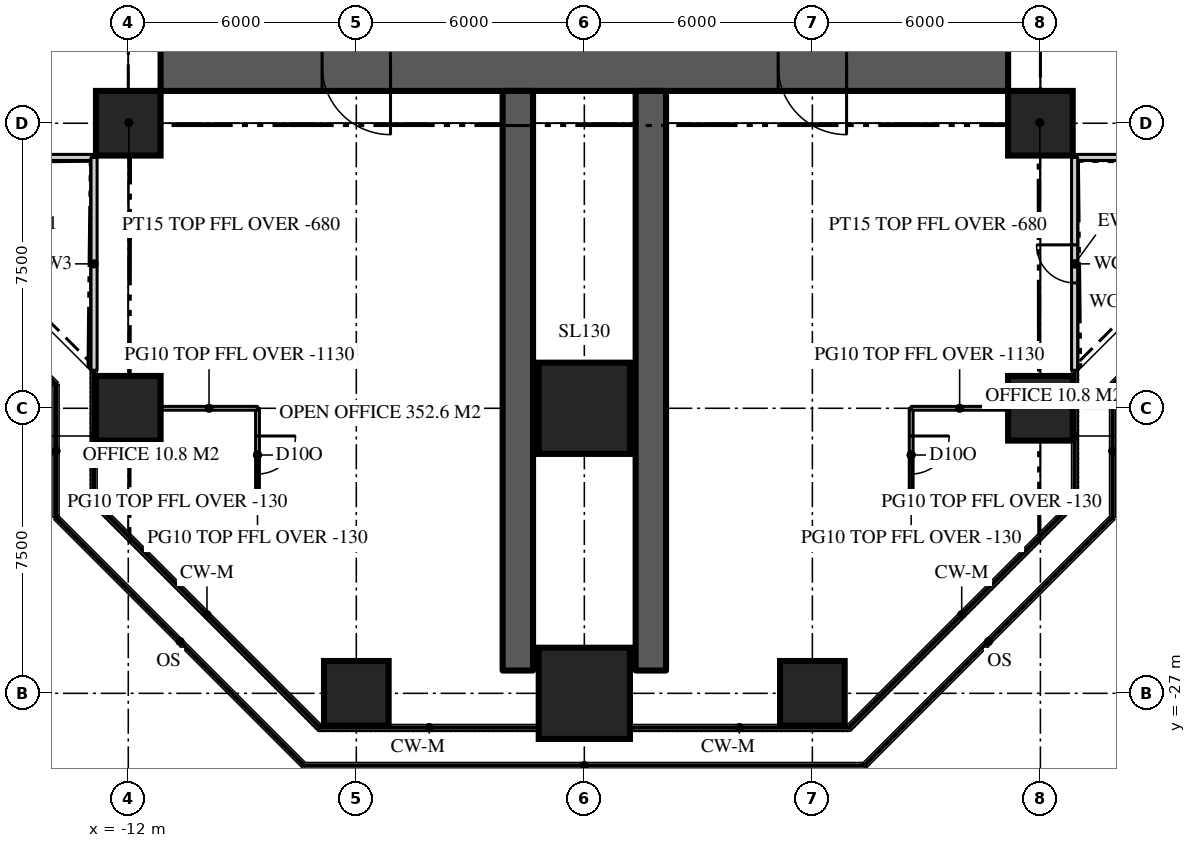
"""IFC4 building model, lengths in metres.
Left out: names, types, materials, properties, quantities, classifications, styles, units other than length and angle.
Written with IfcOpenShell. Run it as: python <this file> out.ifc"""

import sys

from ifc_helpers import new_model, si_unit, direction, frame, frame_2d, origin, origin_2d, place, context, subcontext, project, spatial, rectangle, extrude, element, fill, save


model = new_model("IFC4")
c1 = context("Model", 3, precision=1e-05, world=origin(), true_north=direction((0.0, 1.0)))
c2 = subcontext(c1, "Body", "Model", "MODEL_VIEW")
j1 = project(units=[si_unit("LENGTHUNIT", "METRE"), si_unit("PLANEANGLEUNIT", "RADIAN")], contexts=[c1])
p1 = place(None, origin())
s1 = spatial("IfcSite", under=j1, at=p1, CompositionType="ELEMENT")
p2 = place(p1, origin())
s2 = spatial("IfcBuilding", under=s1, at=p2, CompositionType="ELEMENT")
p3 = place(p2, frame((0.0, 0.0, 139.8)))
s3 = spatial("IfcBuildingStorey", under=s2, at=p3, CompositionType="ELEMENT", Elevation=139.8)
p4 = place(p3, frame((11.15, -10.5, 0.0), z_axis=(0.0, 0.0, 1.0), x_axis=(-1.0, 0.0, 0.0)))
e1 = element("IfcWall", 1, at=p4, inside=s3, PredefinedType="SHEAR", context=c2, shape_type="SweptSolid", body=[
    extrude(rectangle(XDim=22.3, YDim=1.3, at=frame_2d((11.15, 0.0))), origin(), (0.0, 0.0, 1.0), 3.9),
])
p5 = place(p4, frame((16.25, 0.0, 0.0)))
e2 = element("IfcOpeningElement", 2, at=p5, cuts=e1, PredefinedType="OPENING", context=c2, shape_type="SweptSolid", body=[
    extrude(rectangle(XDim=1.8, YDim=2.2, at=frame_2d((0.9, 1.1))), frame((0.0, 0.66, 0.0), z_axis=(0.0, -1.0, 0.0), x_axis=(1.0, 0.0, 0.0)), (0.0, 0.0, 1.0), 1.32),
])
p6 = place(p4, frame((4.25, 0.0, 0.0)))
e3 = element("IfcOpeningElement", 3, at=p6, cuts=e1, PredefinedType="OPENING", context=c2, shape_type="SweptSolid", body=[
    extrude(rectangle(XDim=1.8, YDim=2.2, at=frame_2d((0.9, 1.1))), frame((0.0, 0.66, 0.0), z_axis=(0.0, -1.0, 0.0), x_axis=(1.0, 0.0, 0.0)), (0.0, 0.0, 1.0), 1.32),
])
for number, where, z_axis, x_axis in (
    (4, (-1.75, -11.15, 0.0), (0.0, 0.0, 1.0), (0.0, -1.0, 0.0)),
    (5, (1.75, -11.15, 0.0), (0.0, 0.0, 1.0), (0.0, -1.0, 0.0)),
):
    element("IfcWall", number, at=place(p3, frame(where, z_axis=z_axis, x_axis=x_axis)), inside=s3, PredefinedType="SHEAR", context=c2, shape_type="SweptSolid", body=[
        extrude(rectangle(XDim=15.25, YDim=0.8, at=frame_2d((7.625, 0.0))), origin(), (0.0, 0.0, 1.0), 3.9),
    ])
p7 = place(p3, frame((-6.0, -27.0, 0.0), z_axis=(0.0, 0.0, 1.0), x_axis=(1.0, 0.0, 0.0)))
e6 = element("IfcColumn", 6, at=p7, inside=s3, PredefinedType="COLUMN", context=c2, shape_type="SweptSolid", body=[
    extrude(rectangle(XDim=1.7, YDim=1.7, at=origin_2d()), origin(), (0.0, 0.0, 1.0), 3.9),
])
p8 = place(p3, frame((0.0, -27.0, 0.0), z_axis=(0.0, 0.0, 1.0), x_axis=(1.0, 0.0, 0.0)))
e7 = element("IfcColumn", 7, at=p8, inside=s3, PredefinedType="COLUMN", context=c2, shape_type="SweptSolid", body=[
    extrude(rectangle(XDim=2.4, YDim=2.4, at=origin_2d()), origin(), (0.0, 0.0, 1.0), 3.9),
])
for number, where, z_axis, x_axis in (
    (8, (6.0, -27.0, 0.0), (0.0, 0.0, 1.0), (1.0, 0.0, 0.0)),
    (9, (-12.0, -19.5, 0.0), (0.0, 0.0, 1.0), (1.0, 0.0, 0.0)),
):
    element("IfcColumn", number, at=place(p3, frame(where, z_axis=z_axis, x_axis=x_axis)), inside=s3, PredefinedType="COLUMN", context=c2, shape_type="SweptSolid", body=[
        extrude(rectangle(XDim=1.7, YDim=1.7, at=origin_2d()), origin(), (0.0, 0.0, 1.0), 3.9),
    ])
p9 = place(p3, frame((0.0, -19.5, 0.0), z_axis=(0.0, 0.0, 1.0), x_axis=(1.0, 0.0, 0.0)))
e10 = element("IfcColumn", 10, at=p9, inside=s3, PredefinedType="COLUMN", context=c2, shape_type="SweptSolid", body=[
    extrude(rectangle(XDim=2.4, YDim=2.4, at=origin_2d()), origin(), (0.0, 0.0, 1.0), 3.9),
])
for number, where, z_axis, x_axis in (
    (11, (12.0, -19.5, 0.0), (0.0, 0.0, 1.0), (1.0, 0.0, 0.0)),
    (12, (-12.0, -12.0, 0.0), (0.0, 0.0, 1.0), (1.0, 0.0, 0.0)),
    (13, (12.0, -12.0, 0.0), (0.0, 0.0, 1.0), (1.0, 0.0, 0.0)),
):
    element("IfcColumn", number, at=place(p3, frame(where, z_axis=z_axis, x_axis=x_axis)), inside=s3, PredefinedType="COLUMN", context=c2, shape_type="SweptSolid", body=[
        extrude(rectangle(XDim=1.7, YDim=1.7, at=origin_2d()), origin(), (0.0, 0.0, 1.0), 3.9),
    ])
p10 = place(p3, frame((12.9, -12.9, 0.0), z_axis=(0.0, 0.0, 1.0), x_axis=(1.0, 0.0, 0.0)))
e14 = element("IfcWall", 14, at=p10, inside=s3, PredefinedType="SOLIDWALL", context=c2, shape_type="SweptSolid", body=[
    extrude(rectangle(XDim=5.6, YDim=0.16, at=frame_2d((2.8, 0.0))), origin(), (0.0, 0.0, 1.0), 3.77),
])
p11 = place(p3, frame((-18.5, -12.9, 0.0), z_axis=(0.0, 0.0, 1.0), x_axis=(1.0, 0.0, 0.0)))
e15 = element("IfcWall", 15, at=p11, inside=s3, PredefinedType="SOLIDWALL", context=c2, shape_type="SweptSolid", body=[
    extrude(rectangle(XDim=5.6, YDim=0.16, at=frame_2d((2.8, 0.0))), origin(), (0.0, 0.0, 1.0), 3.77),
])
p12 = place(p11, frame((2.3, 0.0, 0.0)))
e16 = element("IfcOpeningElement", 16, at=p12, cuts=e15, PredefinedType="OPENING", context=c2, shape_type="SweptSolid", body=[
    extrude(rectangle(XDim=1.0, YDim=2.2, at=frame_2d((0.5, 1.1))), frame((0.0, 0.09, 0.0), z_axis=(0.0, -1.0, 0.0), x_axis=(1.0, 0.0, 0.0)), (0.0, 0.0, 1.0), 0.18),
])
p13 = place(p3, frame((-12.9, -12.9, 0.0), z_axis=(0.0, 0.0, 1.0), x_axis=(0.0, -1.0, 0.0)))
e17 = element("IfcWall", 17, at=p13, inside=s3, PredefinedType="SOLIDWALL", context=c2, shape_type="SweptSolid", body=[
    extrude(rectangle(XDim=5.6, YDim=0.16, at=frame_2d((2.8, 0.0))), origin(), (0.0, 0.0, 1.0), 3.77),
])
p14 = place(p3, frame((12.9, -18.5, 0.0), z_axis=(0.0, 0.0, 1.0), x_axis=(0.0, 1.0, 0.0)))
e18 = element("IfcWall", 18, at=p14, inside=s3, PredefinedType="SOLIDWALL", context=c2, shape_type="SweptSolid", body=[
    extrude(rectangle(XDim=5.6, YDim=0.16, at=frame_2d((2.8, 0.0))), origin(), (0.0, 0.0, 1.0), 3.77),
])
p15 = place(p14, frame((2.3, 0.0, 0.0)))
e19 = element("IfcOpeningElement", 19, at=p15, cuts=e18, PredefinedType="OPENING", context=c2, shape_type="SweptSolid", body=[
    extrude(rectangle(XDim=1.0, YDim=2.2, at=frame_2d((0.5, 1.1))), frame((0.0, 0.09, 0.0), z_axis=(0.0, -1.0, 0.0), x_axis=(1.0, 0.0, 0.0)), (0.0, 0.0, 1.0), 0.18),
])
p16 = place(p3, frame((8.6, -19.5, 0.0), z_axis=(0.0, 0.0, 1.0), x_axis=(0.0, -1.0, 0.0)))
e20 = element("IfcWall", 20, at=p16, inside=s3, PredefinedType="PARTITIONING", context=c2, shape_type="SweptSolid", body=[
    extrude(rectangle(XDim=2.459, YDim=0.1, at=frame_2d((1.229, 0.0))), origin(), (0.0, 0.0, 1.0), 3.77),
])
p17 = place(p16, frame((0.729, 0.0, 0.0)))
e21 = element("IfcOpeningElement", 21, at=p17, cuts=e20, PredefinedType="OPENING", context=c2, shape_type="SweptSolid", body=[
    extrude(rectangle(XDim=1.0, YDim=2.2, at=frame_2d((0.5, 1.1))), frame((0.0, 0.06, 0.0), z_axis=(0.0, -1.0, 0.0), x_axis=(1.0, 0.0, 0.0)), (0.0, 0.0, 1.0), 0.12),
])
p18 = place(p3, frame((8.6, -19.5, 0.0), z_axis=(0.0, 0.0, 1.0), x_axis=(1.0, 0.0, 0.0)))
e22 = element("IfcWall", 22, at=p18, inside=s3, PredefinedType="PARTITIONING", context=c2, shape_type="SweptSolid", body=[
    extrude(rectangle(XDim=2.55, YDim=0.1, at=frame_2d((1.275, 0.0))), origin(), (0.0, 0.0, 1.0), 2.77),
])
p19 = place(p3, frame((8.6, -21.959, 0.0), z_axis=(0.0, 0.0, 1.0), x_axis=(1.0, 0.0, 0.0)))
e23 = element("IfcWall", 23, at=p19, inside=s3, PredefinedType="PARTITIONING", context=c2, shape_type="SweptSolid", body=[
    extrude(rectangle(XDim=4.22, YDim=0.1, at=frame_2d((2.11, 0.0))), origin(), (0.0, 0.0, 1.0), 3.77),
])
p20 = place(p3, frame((-8.6, -19.5, 0.0), z_axis=(0.0, 0.0, 1.0), x_axis=(0.0, -1.0, 0.0)))
e24 = element("IfcWall", 24, at=p20, inside=s3, PredefinedType="PARTITIONING", context=c2, shape_type="SweptSolid", body=[
    extrude(rectangle(XDim=2.459, YDim=0.1, at=frame_2d((1.229, 0.0))), origin(), (0.0, 0.0, 1.0), 3.77),
])
p21 = place(p20, frame((0.729, 0.0, 0.0)))
e25 = element("IfcOpeningElement", 25, at=p21, cuts=e24, PredefinedType="OPENING", context=c2, shape_type="SweptSolid", body=[
    extrude(rectangle(XDim=1.0, YDim=2.2, at=frame_2d((0.5, 1.1))), frame((0.0, 0.06, 0.0), z_axis=(0.0, -1.0, 0.0), x_axis=(1.0, 0.0, 0.0)), (0.0, 0.0, 1.0), 0.12),
])
p22 = place(p3, frame((-8.6, -19.5, 0.0), z_axis=(0.0, 0.0, 1.0), x_axis=(-1.0, 0.0, 0.0)))
e26 = element("IfcWall", 26, at=p22, inside=s3, PredefinedType="PARTITIONING", context=c2, shape_type="SweptSolid", body=[
    extrude(rectangle(XDim=2.55, YDim=0.1, at=frame_2d((1.275, 0.0))), origin(), (0.0, 0.0, 1.0), 2.77),
])
p23 = place(p3, frame((-8.6, -21.959, 0.0), z_axis=(0.0, 0.0, 1.0), x_axis=(-1.0, 0.0, 0.0)))
e27 = element("IfcWall", 27, at=p23, inside=s3, PredefinedType="PARTITIONING", context=c2, shape_type="SweptSolid", body=[
    extrude(rectangle(XDim=4.22, YDim=0.1, at=frame_2d((2.11, 0.0))), origin(), (0.0, 0.0, 1.0), 3.77),
])
for number, where, z_axis, x_axis in (
    (28, (-11.15, -11.15, 0.0), (0.0, 0.0, 1.0), (-0.707, -0.707, 0.0)),
    (29, (11.15, -11.15, 0.0), (0.0, 0.0, 1.0), (0.707, -0.707, 0.0)),
):
    element("IfcWall", number, at=place(p3, frame(where, z_axis=z_axis, x_axis=x_axis)), inside=s3, PredefinedType="PARTITIONING", context=c2, shape_type="SweptSolid", body=[
        extrude(rectangle(XDim=2.362, YDim=0.15, at=frame_2d((1.181, 0.0))), origin(), (0.0, 0.0, 1.0), 3.22),
    ])
p24 = place(p15, origin())
e30 = element("IfcDoor", 30, at=p24, inside=s3, OperationType="SINGLE_SWING_RIGHT", PredefinedType="DOOR", context=c2, shape_type="SweptSolid", body=[
    extrude(rectangle(XDim=1.0, YDim=2.2, at=frame_2d((0.5, 1.1))), frame((0.0, 0.025, 0.0), z_axis=(0.0, -1.0, 0.0), x_axis=(1.0, 0.0, 0.0)), (0.0, 0.0, 1.0), 0.05),
])
fill(e19, e30)
p25 = place(p5, origin())
e31 = element("IfcDoor", 31, at=p25, inside=s3, OperationType="DOUBLE_DOOR_DOUBLE_SWING", PredefinedType="DOOR", context=c2, shape_type="SweptSolid", body=[
    extrude(rectangle(XDim=1.8, YDim=2.2, at=frame_2d((0.9, 1.1))), frame((0.0, 0.025, 0.0), z_axis=(0.0, -1.0, 0.0), x_axis=(1.0, 0.0, 0.0)), (0.0, 0.0, 1.0), 0.05),
])
fill(e2, e31)
p26 = place(p6, origin())
e32 = element("IfcDoor", 32, at=p26, inside=s3, OperationType="DOUBLE_DOOR_DOUBLE_SWING", PredefinedType="DOOR", context=c2, shape_type="SweptSolid", body=[
    extrude(rectangle(XDim=1.8, YDim=2.2, at=frame_2d((0.9, 1.1))), frame((0.0, 0.025, 0.0), z_axis=(0.0, -1.0, 0.0), x_axis=(1.0, 0.0, 0.0)), (0.0, 0.0, 1.0), 0.05),
])
fill(e3, e32)
p27 = place(p17, origin())
e33 = element("IfcDoor", 33, at=p27, inside=s3, OperationType="SINGLE_SWING_LEFT", PredefinedType="DOOR", context=c2, shape_type="SweptSolid", body=[
    extrude(rectangle(XDim=1.0, YDim=2.2, at=frame_2d((0.5, 1.1))), frame((0.0, 0.025, 0.0), z_axis=(0.0, -1.0, 0.0), x_axis=(1.0, 0.0, 0.0)), (0.0, 0.0, 1.0), 0.05),
])
fill(e21, e33)
p28 = place(p21, origin())
e34 = element("IfcDoor", 34, at=p28, inside=s3, OperationType="SINGLE_SWING_LEFT", PredefinedType="DOOR", context=c2, shape_type="SweptSolid", body=[
    extrude(rectangle(XDim=1.0, YDim=2.2, at=frame_2d((0.5, 1.1))), frame((0.0, 0.025, 0.0), z_axis=(0.0, -1.0, 0.0), x_axis=(1.0, 0.0, 0.0)), (0.0, 0.0, 1.0), 0.05),
])
fill(e25, e34)
save(model, sys.argv[1])
